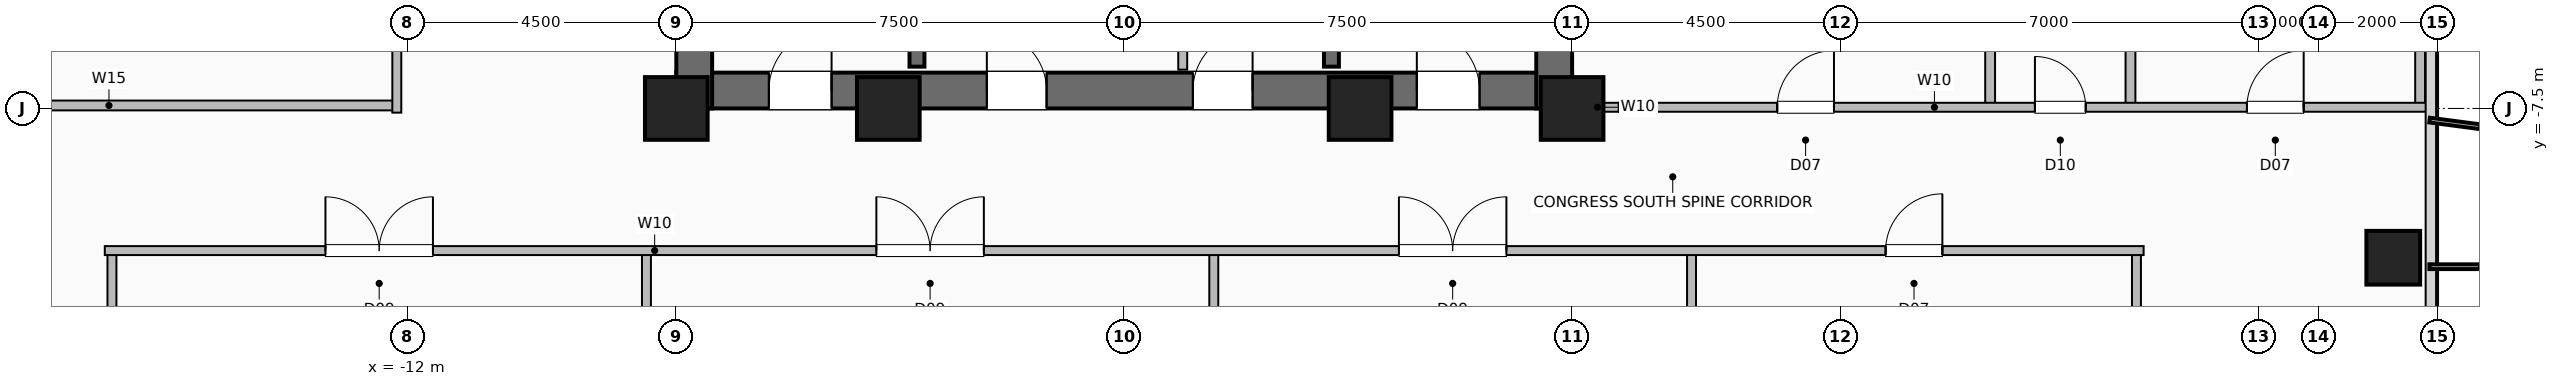
"""IFC4 building model, lengths in metres.
Left out: names, types, materials, properties, quantities, classifications, styles, units other than length and angle.
Written with IfcOpenShell. Run it as: python <this file> out.ifc"""

import sys

from ifc_helpers import new_model, si_unit, direction, frame, frame_2d, origin, origin_2d, place, context, subcontext, project, spatial, rectangle, hollow_rectangle, extrude, element, fill, save


model = new_model("IFC4")
c1 = context("Model", 3, precision=1e-05, world=origin(), true_north=direction((0.0, 1.0)))
c2 = subcontext(c1, "Body", "Model", "MODEL_VIEW")
j1 = project(units=[si_unit("LENGTHUNIT", "METRE"), si_unit("PLANEANGLEUNIT", "RADIAN")], contexts=[c1])
p1 = place(None, origin())
s1 = spatial("IfcSite", under=j1, at=p1, CompositionType="ELEMENT")
p2 = place(p1, origin())
s2 = spatial("IfcBuilding", under=s1, at=p2, CompositionType="ELEMENT")
p3 = place(p2, frame((0.0, 0.0, 137.2)))
s3 = spatial("IfcBuildingStorey", under=s2, at=p3, CompositionType="ELEMENT", Elevation=137.2)
for number, where, z_axis, x_axis in (
    (1, (-7.5, -7.5, 0.0), (0.0, 0.0, 1.0), (1.0, 0.0, 0.0)),
    (2, (-3.95, -7.5, 0.0), (0.0, 0.0, 1.0), (1.0, 0.0, 0.0)),
    (3, (3.95, -7.5, 0.0), (0.0, 0.0, 1.0), (1.0, 0.0, 0.0)),
    (4, (7.5, -7.5, 0.0), (0.0, 0.0, 1.0), (1.0, 0.0, 0.0)),
):
    element("IfcColumn", number, at=place(p3, frame(where, z_axis=z_axis, x_axis=x_axis)), inside=s3, PredefinedType="COLUMN", context=c2, shape_type="SweptSolid", body=[
        extrude(hollow_rectangle(XDim=1.05, YDim=1.05, WallThickness=0.05, at=origin_2d()), origin(), (0.0, 0.0, 1.0), 3.6),
    ])
p4 = place(p3, frame((21.25, -10.0, 0.0), z_axis=(0.0, 0.0, 1.0), x_axis=(1.0, 0.0, 0.0)))
e5 = element("IfcColumn", 5, at=p4, inside=s3, PredefinedType="COLUMN", context=c2, shape_type="SweptSolid", body=[
    extrude(hollow_rectangle(XDim=0.9, YDim=0.9, WallThickness=0.045, at=origin_2d()), origin(), (0.0, 0.0, 1.0), 3.6),
])
p5 = place(p3, frame((-7.5, -7.2, 0.0), z_axis=(0.0, 0.0, 1.0), x_axis=(1.0, 0.0, 0.0)))
e6 = element("IfcWall", 6, at=p5, inside=s3, PredefinedType="SHEAR", context=c2, shape_type="SweptSolid", body=[
    extrude(rectangle(XDim=15.0, YDim=0.6, at=frame_2d((7.5, 0.0))), origin(), (0.0, 0.0, 1.0), 3.36),
])
p6 = place(p5, frame((1.55, 0.0, 0.0)))
e7 = element("IfcOpeningElement", 7, at=p6, cuts=e6, PredefinedType="OPENING", context=c2, shape_type="SweptSolid", body=[
    extrude(rectangle(XDim=1.05, YDim=2.08, at=frame_2d((0.525, 1.04))), frame((0.0, 0.31, 0.0), z_axis=(0.0, -1.0, 0.0), x_axis=(1.0, 0.0, 0.0)), (0.0, 0.0, 1.0), 0.62),
])
p7 = place(p5, frame((12.4, 0.0, 0.0)))
e8 = element("IfcOpeningElement", 8, at=p7, cuts=e6, PredefinedType="OPENING", context=c2, shape_type="SweptSolid", body=[
    extrude(rectangle(XDim=1.05, YDim=2.08, at=frame_2d((0.525, 1.04))), frame((0.0, 0.31, 0.0), z_axis=(0.0, -1.0, 0.0), x_axis=(1.0, 0.0, 0.0)), (0.0, 0.0, 1.0), 0.62),
])
p8 = place(p5, frame((5.2, 0.0, 0.0)))
e9 = element("IfcOpeningElement", 9, at=p8, cuts=e6, PredefinedType="OPENING", context=c2, shape_type="SweptSolid", body=[
    extrude(rectangle(XDim=1.0, YDim=2.08, at=frame_2d((0.5, 1.04))), frame((0.0, 0.31, 0.0), z_axis=(0.0, -1.0, 0.0), x_axis=(1.0, 0.0, 0.0)), (0.0, 0.0, 1.0), 0.62),
])
p9 = place(p5, frame((8.65, 0.0, 0.0)))
e10 = element("IfcOpeningElement", 10, at=p9, cuts=e6, PredefinedType="OPENING", context=c2, shape_type="SweptSolid", body=[
    extrude(rectangle(XDim=1.0, YDim=2.08, at=frame_2d((0.5, 1.04))), frame((0.0, 0.31, 0.0), z_axis=(0.0, -1.0, 0.0), x_axis=(1.0, 0.0, 0.0)), (0.0, 0.0, 1.0), 0.62),
])
p10 = place(p3, frame((-7.2, -7.5, 0.0), z_axis=(0.0, 0.0, 1.0), x_axis=(0.0, 1.0, 0.0)))
e11 = element("IfcWall", 11, at=p10, inside=s3, PredefinedType="SHEAR", context=c2, shape_type="SweptSolid", body=[
    extrude(rectangle(XDim=15.0, YDim=0.6, at=frame_2d((7.5, 0.0))), origin(), (0.0, 0.0, 1.0), 3.36),
])
p11 = place(p10, frame((9.5, 0.0, 0.0)))
e12 = element("IfcOpeningElement", 12, at=p11, cuts=e11, PredefinedType="OPENING", context=c2, shape_type="SweptSolid", body=[
    extrude(rectangle(XDim=1.0, YDim=2.08, at=frame_2d((0.5, 1.04))), frame((0.0, 0.31, 0.0), z_axis=(0.0, -1.0, 0.0), x_axis=(1.0, 0.0, 0.0)), (0.0, 0.0, 1.0), 0.62),
])
p12 = place(p3, frame((7.2, -7.5, 0.0), z_axis=(0.0, 0.0, 1.0), x_axis=(0.0, 1.0, 0.0)))
e13 = element("IfcWall", 13, at=p12, inside=s3, PredefinedType="SHEAR", context=c2, shape_type="SweptSolid", body=[
    extrude(rectangle(XDim=15.0, YDim=0.6, at=frame_2d((7.5, 0.0))), origin(), (0.0, 0.0, 1.0), 3.36),
])
for number, where, z_axis, x_axis in (
    (14, (-3.47, -6.8, 0.0), (0.0, 0.0, 1.0), (0.0, 1.0, 0.0)),
    (15, (3.47, -6.8, 0.0), (0.0, 0.0, 1.0), (0.0, 1.0, 0.0)),
):
    element("IfcWall", number, at=place(p3, frame(where, z_axis=z_axis, x_axis=x_axis)), inside=s3, PredefinedType="SHEAR", context=c2, shape_type="SweptSolid", body=[
        extrude(rectangle(XDim=7.72, YDim=0.25, at=frame_2d((3.86, 0.0))), origin(), (0.0, 0.0, 1.0), 3.36),
    ])
p13 = place(p3, frame((0.98, -6.85, 0.0), z_axis=(0.0, 0.0, 1.0), x_axis=(0.0, 1.0, 0.0)))
e16 = element("IfcWall", 16, at=p13, inside=s3, PredefinedType="PARTITIONING", context=c2, shape_type="SweptSolid", body=[
    extrude(rectangle(XDim=4.42, YDim=0.15, at=frame_2d((2.21, 0.0))), origin(), (0.0, 0.0, 1.0), 3.36),
])
for number, where, z_axis, x_axis in (
    (17, (-16.95, -21.82, 0.0), (0.0, 0.0, 1.0), (0.0, 1.0, 0.0)),
    (18, (-8.0, -21.82, 0.0), (0.0, 0.0, 1.0), (0.0, 1.0, 0.0)),
    (19, (1.5, -21.82, 0.0), (0.0, 0.0, 1.0), (0.0, 1.0, 0.0)),
    (20, (9.5, -21.82, 0.0), (0.0, 0.0, 1.0), (0.0, 1.0, 0.0)),
    (21, (16.95, -21.82, 0.0), (0.0, 0.0, 1.0), (0.0, 1.0, 0.0)),
):
    element("IfcWall", number, at=place(p3, frame(where, z_axis=z_axis, x_axis=x_axis)), inside=s3, PredefinedType="PARTITIONING", context=c2, shape_type="SweptSolid", body=[
        extrude(rectangle(XDim=11.94, YDim=0.15, at=frame_2d((5.97, 0.0))), origin(), (0.0, 0.0, 1.0), 3.36),
    ])
p14 = place(p3, frame((-17.07, -9.88, 0.0), z_axis=(0.0, 0.0, 1.0), x_axis=(1.0, 0.0, 0.0)))
e22 = element("IfcWall", 22, at=p14, inside=s3, PredefinedType="PARTITIONING", context=c2, shape_type="SweptSolid", body=[
    extrude(rectangle(XDim=34.14, YDim=0.15, at=frame_2d((17.07, 0.0))), origin(), (0.0, 0.0, 1.0), 3.36),
])
p15 = place(p14, frame((3.695, 0.0, 0.0)))
e23 = element("IfcOpeningElement", 23, at=p15, cuts=e22, PredefinedType="OPENING", context=c2, shape_type="SweptSolid", body=[
    extrude(rectangle(XDim=1.8, YDim=2.08, at=frame_2d((0.9, 1.04))), frame((0.0, 0.085, 0.0), z_axis=(0.0, -1.0, 0.0), x_axis=(1.0, 0.0, 0.0)), (0.0, 0.0, 1.0), 0.17),
])
p16 = place(p14, frame((12.92, 0.0, 0.0)))
e24 = element("IfcOpeningElement", 24, at=p16, cuts=e22, PredefinedType="OPENING", context=c2, shape_type="SweptSolid", body=[
    extrude(rectangle(XDim=1.8, YDim=2.08, at=frame_2d((0.9, 1.04))), frame((0.0, 0.085, 0.0), z_axis=(0.0, -1.0, 0.0), x_axis=(1.0, 0.0, 0.0)), (0.0, 0.0, 1.0), 0.17),
])
p17 = place(p14, frame((21.67, 0.0, 0.0)))
e25 = element("IfcOpeningElement", 25, at=p17, cuts=e22, PredefinedType="OPENING", context=c2, shape_type="SweptSolid", body=[
    extrude(rectangle(XDim=1.8, YDim=2.08, at=frame_2d((0.9, 1.04))), frame((0.0, 0.085, 0.0), z_axis=(0.0, -1.0, 0.0), x_axis=(1.0, 0.0, 0.0)), (0.0, 0.0, 1.0), 0.17),
])
p18 = place(p14, frame((29.82, 0.0, 0.0)))
e26 = element("IfcOpeningElement", 26, at=p18, cuts=e22, PredefinedType="OPENING", context=c2, shape_type="SweptSolid", body=[
    extrude(rectangle(XDim=0.95, YDim=2.06, at=frame_2d((0.475, 1.03))), frame((0.0, 0.085, 0.0), z_axis=(0.0, -1.0, 0.0), x_axis=(1.0, 0.0, 0.0)), (0.0, 0.0, 1.0), 0.17),
])
p19 = place(p3, frame((-21.82, -7.45, 0.0), z_axis=(0.0, 0.0, 1.0), x_axis=(1.0, 0.0, 0.0)))
e27 = element("IfcWall", 27, at=p19, inside=s3, PredefinedType="PLUMBINGWALL", context=c2, shape_type="SweptSolid", body=[
    extrude(rectangle(XDim=9.64, YDim=0.165, at=frame_2d((4.82, 0.0))), origin(), (0.0, 0.0, 1.0), 3.36),
])
p20 = place(p3, frame((-12.18, -7.57, 0.0), z_axis=(0.0, 0.0, 1.0), x_axis=(0.0, 1.0, 0.0)))
e28 = element("IfcWall", 28, at=p20, inside=s3, PredefinedType="PARTITIONING", context=c2, shape_type="SweptSolid", body=[
    extrude(rectangle(XDim=15.14, YDim=0.15, at=frame_2d((7.57, 0.0))), origin(), (0.0, 0.0, 1.0), 3.36),
])
p21 = place(p20, frame((2.27, 0.0, 0.0)))
e29 = element("IfcOpeningElement", 29, at=p21, cuts=e28, PredefinedType="OPENING", context=c2, shape_type="SweptSolid", body=[
    extrude(rectangle(XDim=0.95, YDim=2.06, at=frame_2d((0.475, 1.03))), frame((0.0, 0.085, 0.0), z_axis=(0.0, -1.0, 0.0), x_axis=(1.0, 0.0, 0.0)), (0.0, 0.0, 1.0), 0.17),
])
p22 = place(p20, frame((8.395, 0.0, 0.0)))
e30 = element("IfcOpeningElement", 30, at=p22, cuts=e28, PredefinedType="OPENING", context=c2, shape_type="SweptSolid", body=[
    extrude(rectangle(XDim=0.95, YDim=2.06, at=frame_2d((0.475, 1.03))), frame((0.0, 0.085, 0.0), z_axis=(0.0, -1.0, 0.0), x_axis=(1.0, 0.0, 0.0)), (0.0, 0.0, 1.0), 0.17),
])
p23 = place(p20, frame((13.27, 0.0, 0.0)))
e31 = element("IfcOpeningElement", 31, at=p23, cuts=e28, PredefinedType="OPENING", context=c2, shape_type="SweptSolid", body=[
    extrude(rectangle(XDim=0.85, YDim=2.05, at=frame_2d((0.425, 1.025))), frame((0.0, 0.085, 0.0), z_axis=(0.0, -1.0, 0.0), x_axis=(1.0, 0.0, 0.0)), (0.0, 0.0, 1.0), 0.17),
])
p24 = place(p3, frame((7.45, -7.48, 0.0), z_axis=(0.0, 0.0, 1.0), x_axis=(1.0, 0.0, 0.0)))
e32 = element("IfcWall", 32, at=p24, inside=s3, PredefinedType="PARTITIONING", context=c2, shape_type="SweptSolid", body=[
    extrude(rectangle(XDim=0.95, YDim=0.15, at=frame_2d((0.475, 0.0))), origin(), (0.0, 0.0, 1.0), 3.36),
])
for number, where, z_axis, x_axis in (
    (33, (16.85, -7.48, 0.0), (0.0, 0.0, 1.0), (0.0, 1.0, 0.0)),
    (34, (14.5, -7.48, 0.0), (0.0, 0.0, 1.0), (0.0, 1.0, 0.0)),
    (35, (21.7, -7.48, 0.0), (0.0, 0.0, 1.0), (0.0, 1.0, 0.0)),
):
    element("IfcWall", number, at=place(p3, frame(where, z_axis=z_axis, x_axis=x_axis)), inside=s3, PredefinedType="PLUMBINGWALL", context=c2, shape_type="SweptSolid", body=[
        extrude(rectangle(XDim=14.88, YDim=0.165, at=frame_2d((7.44, 0.0))), origin(), (0.0, 0.0, 1.0), 3.36),
    ])
p25 = place(p3, frame((8.28, -7.48, 0.0), z_axis=(0.0, 0.0, 1.0), x_axis=(1.0, 0.0, 0.0)))
e36 = element("IfcWall", 36, at=p25, inside=s3, PredefinedType="PARTITIONING", context=c2, shape_type="SweptSolid", body=[
    extrude(rectangle(XDim=13.54, YDim=0.15, at=frame_2d((6.77, 0.0))), origin(), (0.0, 0.0, 1.0), 3.36),
])
p26 = place(p25, frame((2.655, 0.0, 0.0)))
e37 = element("IfcOpeningElement", 37, at=p26, cuts=e36, PredefinedType="OPENING", context=c2, shape_type="SweptSolid", body=[
    extrude(rectangle(XDim=0.95, YDim=2.06, at=frame_2d((0.475, 1.03))), frame((0.0, 0.085, 0.0), z_axis=(0.0, -1.0, 0.0), x_axis=(1.0, 0.0, 0.0)), (0.0, 0.0, 1.0), 0.17),
])
p27 = place(p25, frame((6.97, 0.0, 0.0)))
e38 = element("IfcOpeningElement", 38, at=p27, cuts=e36, PredefinedType="OPENING", context=c2, shape_type="SweptSolid", body=[
    extrude(rectangle(XDim=0.85, YDim=2.05, at=frame_2d((0.425, 1.025))), frame((0.0, 0.085, 0.0), z_axis=(0.0, -1.0, 0.0), x_axis=(1.0, 0.0, 0.0)), (0.0, 0.0, 1.0), 0.17),
])
p28 = place(p25, frame((10.52, 0.0, 0.0)))
e39 = element("IfcOpeningElement", 39, at=p28, cuts=e36, PredefinedType="OPENING", context=c2, shape_type="SweptSolid", body=[
    extrude(rectangle(XDim=0.95, YDim=2.06, at=frame_2d((0.475, 1.03))), frame((0.0, 0.085, 0.0), z_axis=(0.0, -1.0, 0.0), x_axis=(1.0, 0.0, 0.0)), (0.0, 0.0, 1.0), 0.17),
])
p29 = place(p6, origin())
e40 = element("IfcDoor", 40, at=p29, inside=s3, OperationType="SINGLE_SWING_RIGHT", PredefinedType="DOOR", context=c2, shape_type="SweptSolid", body=[
    extrude(rectangle(XDim=1.05, YDim=2.08, at=frame_2d((0.525, 1.04))), frame((0.0, 0.025, 0.0), z_axis=(0.0, -1.0, 0.0), x_axis=(1.0, 0.0, 0.0)), (0.0, 0.0, 1.0), 0.05),
])
fill(e7, e40)
p30 = place(p7, origin())
e41 = element("IfcDoor", 41, at=p30, inside=s3, OperationType="SINGLE_SWING_LEFT", PredefinedType="DOOR", context=c2, shape_type="SweptSolid", body=[
    extrude(rectangle(XDim=1.05, YDim=2.08, at=frame_2d((0.525, 1.04))), frame((0.0, 0.025, 0.0), z_axis=(0.0, -1.0, 0.0), x_axis=(1.0, 0.0, 0.0)), (0.0, 0.0, 1.0), 0.05),
])
fill(e8, e41)
p31 = place(p8, origin())
e42 = element("IfcDoor", 42, at=p31, inside=s3, OperationType="SINGLE_SWING_LEFT", PredefinedType="DOOR", context=c2, shape_type="SweptSolid", body=[
    extrude(rectangle(XDim=1.0, YDim=2.08, at=frame_2d((0.5, 1.04))), frame((0.0, 0.025, 0.0), z_axis=(0.0, -1.0, 0.0), x_axis=(1.0, 0.0, 0.0)), (0.0, 0.0, 1.0), 0.05),
])
fill(e9, e42)
p32 = place(p9, origin())
e43 = element("IfcDoor", 43, at=p32, inside=s3, OperationType="SINGLE_SWING_RIGHT", PredefinedType="DOOR", context=c2, shape_type="SweptSolid", body=[
    extrude(rectangle(XDim=1.0, YDim=2.08, at=frame_2d((0.5, 1.04))), frame((0.0, 0.025, 0.0), z_axis=(0.0, -1.0, 0.0), x_axis=(1.0, 0.0, 0.0)), (0.0, 0.0, 1.0), 0.05),
])
fill(e10, e43)
p33 = place(p15, origin())
e44 = element("IfcDoor", 44, at=p33, inside=s3, OperationType="DOUBLE_DOOR_SINGLE_SWING", PredefinedType="DOOR", context=c2, shape_type="SweptSolid", body=[
    extrude(rectangle(XDim=1.8, YDim=2.08, at=frame_2d((0.9, 1.04))), frame((0.0, 0.025, 0.0), z_axis=(0.0, -1.0, 0.0), x_axis=(1.0, 0.0, 0.0)), (0.0, 0.0, 1.0), 0.05),
])
fill(e23, e44)
p34 = place(p16, origin())
e45 = element("IfcDoor", 45, at=p34, inside=s3, OperationType="DOUBLE_DOOR_SINGLE_SWING", PredefinedType="DOOR", context=c2, shape_type="SweptSolid", body=[
    extrude(rectangle(XDim=1.8, YDim=2.08, at=frame_2d((0.9, 1.04))), frame((0.0, 0.025, 0.0), z_axis=(0.0, -1.0, 0.0), x_axis=(1.0, 0.0, 0.0)), (0.0, 0.0, 1.0), 0.05),
])
fill(e24, e45)
p35 = place(p17, origin())
e46 = element("IfcDoor", 46, at=p35, inside=s3, OperationType="DOUBLE_DOOR_SINGLE_SWING", PredefinedType="DOOR", context=c2, shape_type="SweptSolid", body=[
    extrude(rectangle(XDim=1.8, YDim=2.08, at=frame_2d((0.9, 1.04))), frame((0.0, 0.025, 0.0), z_axis=(0.0, -1.0, 0.0), x_axis=(1.0, 0.0, 0.0)), (0.0, 0.0, 1.0), 0.05),
])
fill(e25, e46)
p36 = place(p18, origin())
e47 = element("IfcDoor", 47, at=p36, inside=s3, OperationType="SINGLE_SWING_RIGHT", PredefinedType="DOOR", context=c2, shape_type="SweptSolid", body=[
    extrude(rectangle(XDim=0.95, YDim=2.06, at=frame_2d((0.475, 1.03))), frame((0.0, 0.025, 0.0), z_axis=(0.0, -1.0, 0.0), x_axis=(1.0, 0.0, 0.0)), (0.0, 0.0, 1.0), 0.05),
])
fill(e26, e47)
p37 = place(p26, origin())
e48 = element("IfcDoor", 48, at=p37, inside=s3, OperationType="SINGLE_SWING_RIGHT", PredefinedType="DOOR", context=c2, shape_type="SweptSolid", body=[
    extrude(rectangle(XDim=0.95, YDim=2.06, at=frame_2d((0.475, 1.03))), frame((0.0, 0.025, 0.0), z_axis=(0.0, -1.0, 0.0), x_axis=(1.0, 0.0, 0.0)), (0.0, 0.0, 1.0), 0.05),
])
fill(e37, e48)
p38 = place(p27, origin())
e49 = element("IfcDoor", 49, at=p38, inside=s3, OperationType="SINGLE_SWING_LEFT", PredefinedType="DOOR", context=c2, shape_type="SweptSolid", body=[
    extrude(rectangle(XDim=0.85, YDim=2.05, at=frame_2d((0.425, 1.025))), frame((0.0, 0.025, 0.0), z_axis=(0.0, -1.0, 0.0), x_axis=(1.0, 0.0, 0.0)), (0.0, 0.0, 1.0), 0.05),
])
fill(e38, e49)
p39 = place(p28, origin())
e50 = element("IfcDoor", 50, at=p39, inside=s3, OperationType="SINGLE_SWING_RIGHT", PredefinedType="DOOR", context=c2, shape_type="SweptSolid", body=[
    extrude(rectangle(XDim=0.95, YDim=2.06, at=frame_2d((0.475, 1.03))), frame((0.0, 0.025, 0.0), z_axis=(0.0, -1.0, 0.0), x_axis=(1.0, 0.0, 0.0)), (0.0, 0.0, 1.0), 0.05),
])
fill(e39, e50)
save(model, sys.argv[1])
